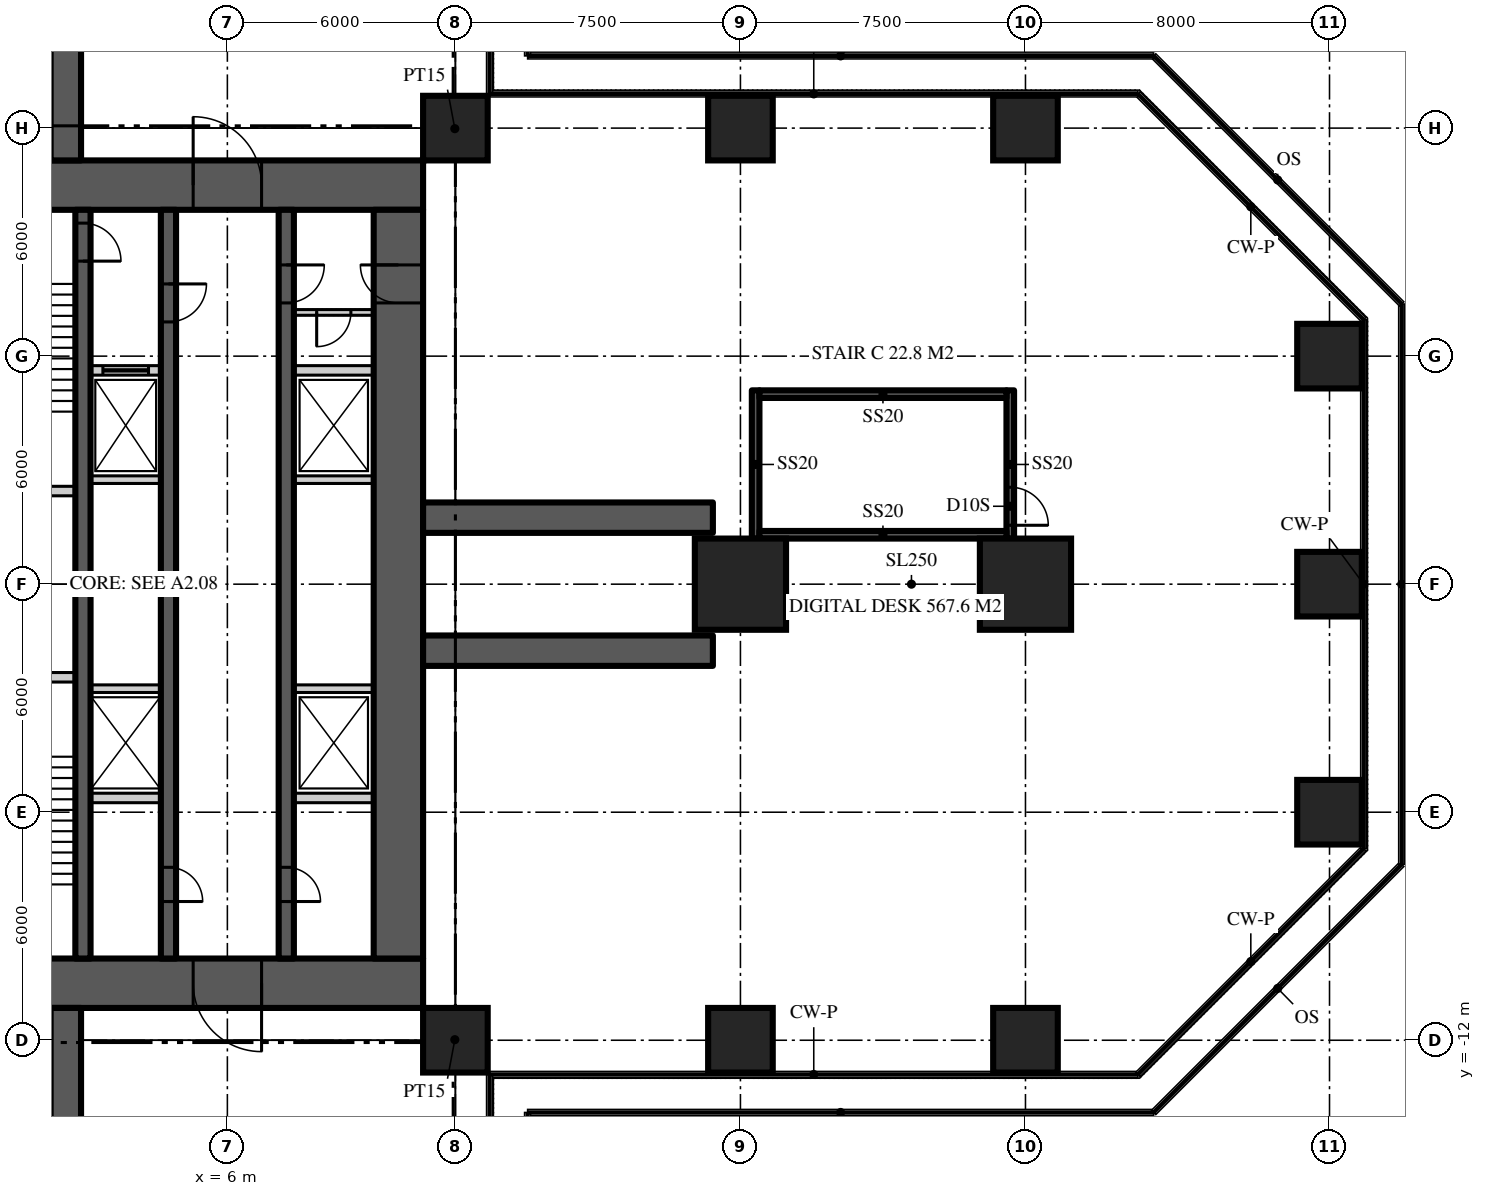
"""IFC4 building model, lengths in metres.
Left out: names, types, materials, properties, quantities, classifications, styles, units other than length and angle.
Written with IfcOpenShell. Run it as: python <this file> out.ifc"""

import sys

from ifc_helpers import new_model, si_unit, direction, frame, frame_2d, origin, origin_2d, place, context, subcontext, project, spatial, rectangle, extrude, element, fill, save


model = new_model("IFC4")
c1 = context("Model", 3, precision=1e-05, world=origin(), true_north=direction((0.0, 1.0)))
c2 = subcontext(c1, "Body", "Model", "MODEL_VIEW")
j1 = project(units=[si_unit("LENGTHUNIT", "METRE"), si_unit("PLANEANGLEUNIT", "RADIAN")], contexts=[c1])
p1 = place(None, origin())
s1 = spatial("IfcSite", under=j1, at=p1, CompositionType="ELEMENT")
p2 = place(p1, origin())
s2 = spatial("IfcBuilding", under=s1, at=p2, CompositionType="ELEMENT")
p3 = place(p2, frame((0.0, 0.0, 33.0)))
s3 = spatial("IfcBuildingStorey", under=s2, at=p3, CompositionType="ELEMENT", Elevation=33.0)
p4 = place(p3, frame((-11.15, 10.5, 0.0), z_axis=(0.0, 0.0, 1.0), x_axis=(1.0, 0.0, 0.0)))
e1 = element("IfcWall", 1, at=p4, inside=s3, PredefinedType="SHEAR", context=c2, shape_type="SweptSolid", body=[
    extrude(rectangle(XDim=22.3, YDim=1.3, at=frame_2d((11.15, 0.0))), origin(), (0.0, 0.0, 1.0), 4.5),
])
p5 = place(p4, frame((4.25, 0.0, 0.0)))
e2 = element("IfcOpeningElement", 2, at=p5, cuts=e1, PredefinedType="OPENING", context=c2, shape_type="SweptSolid", body=[
    extrude(rectangle(XDim=1.8, YDim=2.2, at=frame_2d((0.9, 1.1))), frame((0.0, 0.66, 0.0), z_axis=(0.0, -1.0, 0.0), x_axis=(1.0, 0.0, 0.0)), (0.0, 0.0, 1.0), 1.32),
])
p6 = place(p4, frame((16.25, 0.0, 0.0)))
e3 = element("IfcOpeningElement", 3, at=p6, cuts=e1, PredefinedType="OPENING", context=c2, shape_type="SweptSolid", body=[
    extrude(rectangle(XDim=1.8, YDim=2.2, at=frame_2d((0.9, 1.1))), frame((0.0, 0.66, 0.0), z_axis=(0.0, -1.0, 0.0), x_axis=(1.0, 0.0, 0.0)), (0.0, 0.0, 1.0), 1.32),
])
p7 = place(p3, frame((11.15, -10.5, 0.0), z_axis=(0.0, 0.0, 1.0), x_axis=(-1.0, 0.0, 0.0)))
e4 = element("IfcWall", 4, at=p7, inside=s3, PredefinedType="SHEAR", context=c2, shape_type="SweptSolid", body=[
    extrude(rectangle(XDim=22.3, YDim=1.3, at=frame_2d((11.15, 0.0))), origin(), (0.0, 0.0, 1.0), 4.5),
])
p8 = place(p7, frame((16.25, 0.0, 0.0)))
e5 = element("IfcOpeningElement", 5, at=p8, cuts=e4, PredefinedType="OPENING", context=c2, shape_type="SweptSolid", body=[
    extrude(rectangle(XDim=1.8, YDim=2.2, at=frame_2d((0.9, 1.1))), frame((0.0, 0.66, 0.0), z_axis=(0.0, -1.0, 0.0), x_axis=(1.0, 0.0, 0.0)), (0.0, 0.0, 1.0), 1.32),
])
p9 = place(p7, frame((4.25, 0.0, 0.0)))
e6 = element("IfcOpeningElement", 6, at=p9, cuts=e4, PredefinedType="OPENING", context=c2, shape_type="SweptSolid", body=[
    extrude(rectangle(XDim=1.8, YDim=2.2, at=frame_2d((0.9, 1.1))), frame((0.0, 0.66, 0.0), z_axis=(0.0, -1.0, 0.0), x_axis=(1.0, 0.0, 0.0)), (0.0, 0.0, 1.0), 1.32),
])
p10 = place(p3, frame((10.5, -9.85, 0.0), z_axis=(0.0, 0.0, 1.0), x_axis=(0.0, 1.0, 0.0)))
e7 = element("IfcWall", 7, at=p10, inside=s3, PredefinedType="SHEAR", context=c2, shape_type="SweptSolid", body=[
    extrude(rectangle(XDim=19.7, YDim=1.3, at=frame_2d((9.85, 0.0))), origin(), (0.0, 0.0, 1.0), 4.5),
])
p11 = place(p10, frame((17.25, 0.0, 0.0)))
e8 = element("IfcOpeningElement", 8, at=p11, cuts=e7, PredefinedType="OPENING", context=c2, shape_type="SweptSolid", body=[
    extrude(rectangle(XDim=1.0, YDim=2.2, at=frame_2d((0.5, 1.1))), frame((0.0, 0.66, 0.0), z_axis=(0.0, -1.0, 0.0), x_axis=(1.0, 0.0, 0.0)), (0.0, 0.0, 1.0), 1.32),
])
for number, where, z_axis, x_axis in (
    (9, (11.15, -1.75, 0.0), (0.0, 0.0, 1.0), (1.0, 0.0, 0.0)),
    (10, (11.15, 1.75, 0.0), (0.0, 0.0, 1.0), (1.0, 0.0, 0.0)),
    (11, (1.75, 11.15, 0.0), (0.0, 0.0, 1.0), (0.0, 1.0, 0.0)),
    (12, (1.75, -11.15, 0.0), (0.0, 0.0, 1.0), (0.0, -1.0, 0.0)),
):
    element("IfcWall", number, at=place(p3, frame(where, z_axis=z_axis, x_axis=x_axis)), inside=s3, PredefinedType="SHEAR", context=c2, shape_type="SweptSolid", body=[
        extrude(rectangle(XDim=7.625, YDim=0.8, at=frame_2d((3.812, 0.0))), origin(), (0.0, 0.0, 1.0), 4.5),
    ])
for number, where, z_axis, x_axis in (
    (13, (12.0, -12.0, 0.0), (0.0, 0.0, 1.0), (1.0, 0.0, 0.0)),
    (14, (19.5, -12.0, 0.0), (0.0, 0.0, 1.0), (1.0, 0.0, 0.0)),
    (15, (27.0, -12.0, 0.0), (0.0, 0.0, 1.0), (1.0, 0.0, 0.0)),
    (16, (35.0, -6.0, 0.0), (0.0, 0.0, 1.0), (1.0, 0.0, 0.0)),
):
    element("IfcColumn", number, at=place(p3, frame(where, z_axis=z_axis, x_axis=x_axis)), inside=s3, PredefinedType="COLUMN", context=c2, shape_type="SweptSolid", body=[
        extrude(rectangle(XDim=1.7, YDim=1.7, at=origin_2d()), origin(), (0.0, 0.0, 1.0), 4.5),
    ])
for number, where, z_axis, x_axis in (
    (17, (19.5, 0.0, 0.0), (0.0, 0.0, 1.0), (1.0, 0.0, 0.0)),
    (18, (27.0, 0.0, 0.0), (0.0, 0.0, 1.0), (1.0, 0.0, 0.0)),
):
    element("IfcColumn", number, at=place(p3, frame(where, z_axis=z_axis, x_axis=x_axis)), inside=s3, PredefinedType="COLUMN", context=c2, shape_type="SweptSolid", body=[
        extrude(rectangle(XDim=2.4, YDim=2.4, at=origin_2d()), origin(), (0.0, 0.0, 1.0), 4.5),
    ])
for number, where, z_axis, x_axis in (
    (19, (35.0, 0.0, 0.0), (0.0, 0.0, 1.0), (1.0, 0.0, 0.0)),
    (20, (35.0, 6.0, 0.0), (0.0, 0.0, 1.0), (1.0, 0.0, 0.0)),
    (21, (12.0, 12.0, 0.0), (0.0, 0.0, 1.0), (1.0, 0.0, 0.0)),
    (22, (19.5, 12.0, 0.0), (0.0, 0.0, 1.0), (1.0, 0.0, 0.0)),
    (23, (27.0, 12.0, 0.0), (0.0, 0.0, 1.0), (1.0, 0.0, 0.0)),
):
    element("IfcColumn", number, at=place(p3, frame(where, z_axis=z_axis, x_axis=x_axis)), inside=s3, PredefinedType="COLUMN", context=c2, shape_type="SweptSolid", body=[
        extrude(rectangle(XDim=1.7, YDim=1.7, at=origin_2d()), origin(), (0.0, 0.0, 1.0), 4.5),
    ])
p12 = place(p3, frame((7.55, 9.85, 0.0), z_axis=(0.0, 0.0, 1.0), x_axis=(0.0, -1.0, 0.0)))
e24 = element("IfcWall", 24, at=p12, inside=s3, PredefinedType="SHEAR", context=c2, shape_type="SweptSolid", body=[
    extrude(rectangle(XDim=19.7, YDim=0.4, at=frame_2d((9.85, 0.0))), origin(), (0.0, 0.0, 1.0), 4.5),
])
p13 = place(p12, frame((1.45, 0.0, 0.0)))
e25 = element("IfcOpeningElement", 25, at=p13, cuts=e24, PredefinedType="OPENING", context=c2, shape_type="SweptSolid", body=[
    extrude(rectangle(XDim=1.0, YDim=2.2, at=frame_2d((0.5, 1.1))), frame((0.0, 0.21, 0.0), z_axis=(0.0, -1.0, 0.0), x_axis=(1.0, 0.0, 0.0)), (0.0, 0.0, 1.0), 0.42),
])
p14 = place(p12, frame((17.3, 0.0, 0.0)))
e26 = element("IfcOpeningElement", 26, at=p14, cuts=e24, PredefinedType="OPENING", context=c2, shape_type="SweptSolid", body=[
    extrude(rectangle(XDim=0.9, YDim=2.1, at=frame_2d((0.45, 1.05))), frame((0.0, 0.21, 0.0), z_axis=(0.0, -1.0, 0.0), x_axis=(1.0, 0.0, 0.0)), (0.0, 0.0, 1.0), 0.42),
])
p15 = place(p3, frame((4.45, 9.85, 0.0), z_axis=(0.0, 0.0, 1.0), x_axis=(0.0, -1.0, 0.0)))
e27 = element("IfcWall", 27, at=p15, inside=s3, PredefinedType="SHEAR", context=c2, shape_type="SweptSolid", body=[
    extrude(rectangle(XDim=19.7, YDim=0.4, at=frame_2d((9.85, 0.0))), origin(), (0.0, 0.0, 1.0), 4.5),
])
p16 = place(p15, frame((1.95, 0.0, 0.0)))
e28 = element("IfcOpeningElement", 28, at=p16, cuts=e27, PredefinedType="OPENING", context=c2, shape_type="SweptSolid", body=[
    extrude(rectangle(XDim=1.0, YDim=2.2, at=frame_2d((0.5, 1.1))), frame((0.0, 0.21, 0.0), z_axis=(0.0, -1.0, 0.0), x_axis=(1.0, 0.0, 0.0)), (0.0, 0.0, 1.0), 0.42),
])
p17 = place(p15, frame((17.3, 0.0, 0.0)))
e29 = element("IfcOpeningElement", 29, at=p17, cuts=e27, PredefinedType="OPENING", context=c2, shape_type="SweptSolid", body=[
    extrude(rectangle(XDim=0.9, YDim=2.1, at=frame_2d((0.45, 1.05))), frame((0.0, 0.21, 0.0), z_axis=(0.0, -1.0, 0.0), x_axis=(1.0, 0.0, 0.0)), (0.0, 0.0, 1.0), 0.42),
])
p18 = place(p3, frame((2.2, 9.85, 0.0), z_axis=(0.0, 0.0, 1.0), x_axis=(0.0, -1.0, 0.0)))
e30 = element("IfcWall", 30, at=p18, inside=s3, PredefinedType="SHEAR", context=c2, shape_type="SweptSolid", body=[
    extrude(rectangle(XDim=19.7, YDim=0.4, at=frame_2d((9.85, 0.0))), origin(), (0.0, 0.0, 1.0), 4.5),
])
p19 = place(p18, frame((0.35, 0.0, 0.0)))
e31 = element("IfcOpeningElement", 31, at=p19, cuts=e30, PredefinedType="OPENING", context=c2, shape_type="SweptSolid", body=[
    extrude(rectangle(XDim=1.0, YDim=2.2, at=frame_2d((0.5, 1.1))), frame((0.0, 0.21, 0.0), z_axis=(0.0, -1.0, 0.0), x_axis=(1.0, 0.0, 0.0)), (0.0, 0.0, 1.0), 0.42),
])
p20 = place(p3, frame((2.4, 5.625, 0.0), z_axis=(0.0, 0.0, 1.0), x_axis=(1.0, 0.0, 0.0)))
e32 = element("IfcWall", 32, at=p20, inside=s3, PredefinedType="SOLIDWALL", context=c2, shape_type="SweptSolid", body=[
    extrude(rectangle(XDim=1.85, YDim=0.25, at=frame_2d((0.925, 0.0))), origin(), (0.0, 0.0, 1.0), 4.3),
])
p21 = place(p20, frame((0.325, 0.0, 0.0)))
e33 = element("IfcOpeningElement", 33, at=p21, cuts=e32, PredefinedType="OPENING", context=c2, shape_type="SweptSolid", body=[
    extrude(rectangle(XDim=1.2, YDim=2.2, at=frame_2d((0.6, 1.1))), frame((0.0, 0.135, 0.0), z_axis=(0.0, -1.0, 0.0), x_axis=(1.0, 0.0, 0.0)), (0.0, 0.0, 1.0), 0.27),
])
p22 = place(p3, frame((7.75, 5.625, 0.0), z_axis=(0.0, 0.0, 1.0), x_axis=(1.0, 0.0, 0.0)))
e34 = element("IfcWall", 34, at=p22, inside=s3, PredefinedType="SOLIDWALL", context=c2, shape_type="SweptSolid", body=[
    extrude(rectangle(XDim=2.1, YDim=0.25, at=frame_2d((1.05, 0.0))), origin(), (0.0, 0.0, 1.0), 4.3),
])
p23 = place(p3, frame((2.4, -5.625, 0.0), z_axis=(0.0, 0.0, 1.0), x_axis=(1.0, 0.0, 0.0)))
e35 = element("IfcWall", 35, at=p23, inside=s3, PredefinedType="SOLIDWALL", context=c2, shape_type="SweptSolid", body=[
    extrude(rectangle(XDim=1.85, YDim=0.25, at=frame_2d((0.925, 0.0))), origin(), (0.0, 0.0, 1.0), 4.3),
])
p24 = place(p3, frame((7.75, -5.625, 0.0), z_axis=(0.0, 0.0, 1.0), x_axis=(1.0, 0.0, 0.0)))
e36 = element("IfcWall", 36, at=p24, inside=s3, PredefinedType="SOLIDWALL", context=c2, shape_type="SweptSolid", body=[
    extrude(rectangle(XDim=2.1, YDim=0.25, at=frame_2d((1.05, 0.0))), origin(), (0.0, 0.0, 1.0), 4.3),
])
for number, where, z_axis, x_axis in (
    (37, (-2.0, -2.45, 0.0), (0.0, 0.0, 1.0), (1.0, 0.0, 0.0)),
    (38, (-2.0, 2.45, 0.0), (0.0, 0.0, 1.0), (1.0, 0.0, 0.0)),
):
    element("IfcWall", number, at=place(p3, frame(where, z_axis=z_axis, x_axis=x_axis)), inside=s3, PredefinedType="SOLIDWALL", context=c2, shape_type="SweptSolid", body=[
        extrude(rectangle(XDim=4.0, YDim=0.25, at=frame_2d((2.0, 0.0))), origin(), (0.0, 0.0, 1.0), 4.3),
    ])
p25 = place(p3, frame((2.4, -2.75, 0.0), z_axis=(0.0, 0.0, 1.0), x_axis=(1.0, 0.0, 0.0)))
e39 = element("IfcWall", 39, at=p25, inside=s3, PredefinedType="SOLIDWALL", context=c2, shape_type="SweptSolid", body=[
    extrude(rectangle(XDim=1.85, YDim=0.2, at=frame_2d((0.925, 0.0))), origin(), (0.0, 0.0, 1.0), 4.3),
])
p26 = place(p3, frame((7.75, -2.75, 0.0), z_axis=(0.0, 0.0, 1.0), x_axis=(1.0, 0.0, 0.0)))
e40 = element("IfcWall", 40, at=p26, inside=s3, PredefinedType="SOLIDWALL", context=c2, shape_type="SweptSolid", body=[
    extrude(rectangle(XDim=2.1, YDim=0.2, at=frame_2d((1.05, 0.0))), origin(), (0.0, 0.0, 1.0), 4.3),
])
p27 = place(p3, frame((2.4, 2.75, 0.0), z_axis=(0.0, 0.0, 1.0), x_axis=(1.0, 0.0, 0.0)))
e41 = element("IfcWall", 41, at=p27, inside=s3, PredefinedType="SOLIDWALL", context=c2, shape_type="SweptSolid", body=[
    extrude(rectangle(XDim=1.85, YDim=0.2, at=frame_2d((0.925, 0.0))), origin(), (0.0, 0.0, 1.0), 4.3),
])
p28 = place(p3, frame((7.75, 2.75, 0.0), z_axis=(0.0, 0.0, 1.0), x_axis=(1.0, 0.0, 0.0)))
e42 = element("IfcWall", 42, at=p28, inside=s3, PredefinedType="SOLIDWALL", context=c2, shape_type="SweptSolid", body=[
    extrude(rectangle(XDim=2.1, YDim=0.2, at=frame_2d((1.05, 0.0))), origin(), (0.0, 0.0, 1.0), 4.3),
])
for number, where, z_axis, x_axis in (
    (43, (11.15, 11.15, 0.0), (0.0, 0.0, 1.0), (0.707, 0.707, 0.0)),
    (44, (11.15, -11.15, 0.0), (0.0, 0.0, 1.0), (0.707, -0.707, 0.0)),
):
    element("IfcWall", number, at=place(p3, frame(where, z_axis=z_axis, x_axis=x_axis)), inside=s3, PredefinedType="PARTITIONING", context=c2, shape_type="SweptSolid", body=[
        extrude(rectangle(XDim=2.362, YDim=0.15, at=frame_2d((1.181, 0.0))), origin(), (0.0, 0.0, 1.0), 4.25),
    ])
p29 = place(p3, frame((9.85, 7.15, 0.0), z_axis=(0.0, 0.0, 1.0), x_axis=(-1.0, 0.0, 0.0)))
e45 = element("IfcWall", 45, at=p29, inside=s3, PredefinedType="SOLIDWALL", context=c2, shape_type="SweptSolid", body=[
    extrude(rectangle(XDim=2.1, YDim=0.15, at=frame_2d((1.05, 0.0))), origin(), (0.0, 0.0, 1.0), 4.25),
])
p30 = place(p29, frame((0.6, 0.0, 0.0)))
e46 = element("IfcOpeningElement", 46, at=p30, cuts=e45, PredefinedType="OPENING", context=c2, shape_type="SweptSolid", body=[
    extrude(rectangle(XDim=0.9, YDim=2.1, at=frame_2d((0.45, 1.05))), frame((0.0, 0.085, 0.0), z_axis=(0.0, -1.0, 0.0), x_axis=(1.0, 0.0, 0.0)), (0.0, 0.0, 1.0), 0.17),
])
p31 = place(p3, frame((19.9, 1.2, 0.0), z_axis=(0.0, 0.0, 1.0), x_axis=(0.0, 1.0, 0.0)))
e47 = element("IfcWall", 47, at=p31, inside=s3, PredefinedType="SOLIDWALL", context=c2, shape_type="SweptSolid", body=[
    extrude(rectangle(XDim=3.9, YDim=0.2, at=frame_2d((1.95, 0.0))), origin(), (0.0, 0.0, 1.0), 4.25),
])
p32 = place(p3, frame((26.6, 5.1, 0.0), z_axis=(0.0, 0.0, 1.0), x_axis=(0.0, -1.0, 0.0)))
e48 = element("IfcWall", 48, at=p32, inside=s3, PredefinedType="SOLIDWALL", context=c2, shape_type="SweptSolid", body=[
    extrude(rectangle(XDim=3.9, YDim=0.2, at=frame_2d((1.95, 0.0))), origin(), (0.0, 0.0, 1.0), 4.25),
])
p33 = place(p32, frame((2.55, 0.0, 0.0)))
e49 = element("IfcOpeningElement", 49, at=p33, cuts=e48, PredefinedType="OPENING", context=c2, shape_type="SweptSolid", body=[
    extrude(rectangle(XDim=1.0, YDim=2.2, at=frame_2d((0.5, 1.1))), frame((0.0, 0.11, 0.0), z_axis=(0.0, -1.0, 0.0), x_axis=(1.0, 0.0, 0.0)), (0.0, 0.0, 1.0), 0.22),
])
for number, where, z_axis, x_axis in (
    (50, (20.0, 1.3, 0.0), (0.0, 0.0, 1.0), (1.0, 0.0, 0.0)),
    (51, (26.5, 5.0, 0.0), (0.0, 0.0, 1.0), (-1.0, 0.0, 0.0)),
):
    element("IfcWall", number, at=place(p3, frame(where, z_axis=z_axis, x_axis=x_axis)), inside=s3, PredefinedType="SOLIDWALL", context=c2, shape_type="SweptSolid", body=[
        extrude(rectangle(XDim=6.5, YDim=0.2, at=frame_2d((3.25, 0.0))), origin(), (0.0, 0.0, 1.0), 4.25),
    ])
p34 = place(p6, origin())
e52 = element("IfcDoor", 52, at=p34, inside=s3, OperationType="DOUBLE_DOOR_DOUBLE_SWING", PredefinedType="DOOR", context=c2, shape_type="SweptSolid", body=[
    extrude(rectangle(XDim=1.8, YDim=2.2, at=frame_2d((0.9, 1.1))), frame((0.0, 0.025, 0.0), z_axis=(0.0, -1.0, 0.0), x_axis=(1.0, 0.0, 0.0)), (0.0, 0.0, 1.0), 0.05),
])
fill(e3, e52)
p35 = place(p9, origin())
e53 = element("IfcDoor", 53, at=p35, inside=s3, OperationType="DOUBLE_DOOR_DOUBLE_SWING", PredefinedType="DOOR", context=c2, shape_type="SweptSolid", body=[
    extrude(rectangle(XDim=1.8, YDim=2.2, at=frame_2d((0.9, 1.1))), frame((0.0, 0.025, 0.0), z_axis=(0.0, -1.0, 0.0), x_axis=(1.0, 0.0, 0.0)), (0.0, 0.0, 1.0), 0.05),
])
fill(e6, e53)
p36 = place(p13, origin())
e54 = element("IfcDoor", 54, at=p36, inside=s3, OperationType="SINGLE_SWING_LEFT", PredefinedType="DOOR", context=c2, shape_type="SweptSolid", body=[
    extrude(rectangle(XDim=1.0, YDim=2.2, at=frame_2d((0.5, 1.1))), frame((0.0, 0.025, 0.0), z_axis=(0.0, -1.0, 0.0), x_axis=(1.0, 0.0, 0.0)), (0.0, 0.0, 1.0), 0.05),
])
fill(e25, e54)
p37 = place(p11, origin())
e55 = element("IfcDoor", 55, at=p37, inside=s3, OperationType="SINGLE_SWING_RIGHT", PredefinedType="DOOR", context=c2, shape_type="SweptSolid", body=[
    extrude(rectangle(XDim=1.0, YDim=2.2, at=frame_2d((0.5, 1.1))), frame((0.0, 0.025, 0.0), z_axis=(0.0, -1.0, 0.0), x_axis=(1.0, 0.0, 0.0)), (0.0, 0.0, 1.0), 0.05),
])
fill(e8, e55)
p38 = place(p16, origin())
e56 = element("IfcDoor", 56, at=p38, inside=s3, OperationType="SINGLE_SWING_LEFT", PredefinedType="DOOR", context=c2, shape_type="SweptSolid", body=[
    extrude(rectangle(XDim=1.0, YDim=2.2, at=frame_2d((0.5, 1.1))), frame((0.0, 0.025, 0.0), z_axis=(0.0, -1.0, 0.0), x_axis=(1.0, 0.0, 0.0)), (0.0, 0.0, 1.0), 0.05),
])
fill(e28, e56)
p39 = place(p19, origin())
e57 = element("IfcDoor", 57, at=p39, inside=s3, OperationType="SINGLE_SWING_RIGHT", PredefinedType="DOOR", context=c2, shape_type="SweptSolid", body=[
    extrude(rectangle(XDim=1.0, YDim=2.2, at=frame_2d((0.5, 1.1))), frame((0.0, 0.025, 0.0), z_axis=(0.0, -1.0, 0.0), x_axis=(1.0, 0.0, 0.0)), (0.0, 0.0, 1.0), 0.05),
])
fill(e31, e57)
p40 = place(p14, origin())
e58 = element("IfcDoor", 58, at=p40, inside=s3, OperationType="SINGLE_SWING_RIGHT", PredefinedType="DOOR", context=c2, shape_type="SweptSolid", body=[
    extrude(rectangle(XDim=0.9, YDim=2.1, at=frame_2d((0.45, 1.05))), frame((0.0, 0.025, 0.0), z_axis=(0.0, -1.0, 0.0), x_axis=(1.0, 0.0, 0.0)), (0.0, 0.0, 1.0), 0.05),
])
fill(e26, e58)
p41 = place(p17, origin())
e59 = element("IfcDoor", 59, at=p41, inside=s3, OperationType="SINGLE_SWING_RIGHT", PredefinedType="DOOR", context=c2, shape_type="SweptSolid", body=[
    extrude(rectangle(XDim=0.9, YDim=2.1, at=frame_2d((0.45, 1.05))), frame((0.0, 0.025, 0.0), z_axis=(0.0, -1.0, 0.0), x_axis=(1.0, 0.0, 0.0)), (0.0, 0.0, 1.0), 0.05),
])
fill(e29, e59)
p42 = place(p21, origin())
e60 = element("IfcDoor", 60, at=p42, inside=s3, OperationType="SLIDING_TO_LEFT", PredefinedType="DOOR", context=c2, shape_type="SweptSolid", body=[
    extrude(rectangle(XDim=1.2, YDim=2.2, at=frame_2d((0.6, 1.1))), frame((0.0, 0.025, 0.0), z_axis=(0.0, -1.0, 0.0), x_axis=(1.0, 0.0, 0.0)), (0.0, 0.0, 1.0), 0.05),
])
fill(e33, e60)
p43 = place(p30, origin())
e61 = element("IfcDoor", 61, at=p43, inside=s3, OperationType="SINGLE_SWING_RIGHT", PredefinedType="DOOR", context=c2, shape_type="SweptSolid", body=[
    extrude(rectangle(XDim=0.9, YDim=2.1, at=frame_2d((0.45, 1.05))), frame((0.0, 0.025, 0.0), z_axis=(0.0, -1.0, 0.0), x_axis=(1.0, 0.0, 0.0)), (0.0, 0.0, 1.0), 0.05),
])
fill(e46, e61)
p44 = place(p33, origin())
e62 = element("IfcDoor", 62, at=p44, inside=s3, OperationType="SINGLE_SWING_RIGHT", PredefinedType="DOOR", context=c2, shape_type="SweptSolid", body=[
    extrude(rectangle(XDim=1.0, YDim=2.2, at=frame_2d((0.5, 1.1))), frame((0.0, 0.025, 0.0), z_axis=(0.0, -1.0, 0.0), x_axis=(1.0, 0.0, 0.0)), (0.0, 0.0, 1.0), 0.05),
])
fill(e49, e62)
save(model, sys.argv[1])
